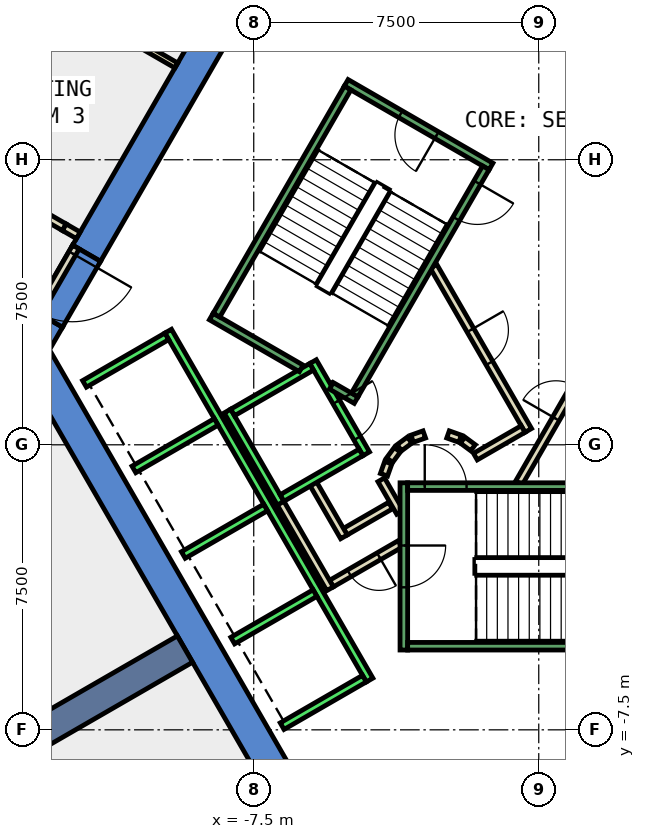
"""IFC4 building model, lengths in metres.
Left out: names, types, materials, properties, quantities, classifications, styles, units other than length and angle.
Written with IfcOpenShell. Run it as: python <this file> out.ifc"""

import sys

from ifc_helpers import new_model, si_unit, direction, frame, frame_2d, origin, place, context, subcontext, project, spatial, polyline, rectangle, outline, extrude, element, fill, save


model = new_model("IFC4")
c1 = context("Model", 3, precision=1e-05, world=origin(), true_north=direction((0.0, 1.0)))
c2 = subcontext(c1, "Body", "Model", "MODEL_VIEW")
j1 = project(units=[si_unit("LENGTHUNIT", "METRE"), si_unit("PLANEANGLEUNIT", "RADIAN")], contexts=[c1])
p1 = place(None, origin())
s1 = spatial("IfcSite", under=j1, at=p1, CompositionType="ELEMENT")
p2 = place(p1, origin())
s2 = spatial("IfcBuilding", under=s1, at=p2, CompositionType="ELEMENT")
p3 = place(p2, frame((0.0, 0.0, 124.4)))
s3 = spatial("IfcBuildingStorey", under=s2, at=p3, CompositionType="ELEMENT", Elevation=124.4)
p4 = place(p3, frame((0.0, 0.0, -0.4)))
e1 = element("IfcWall", 1, at=p4, inside=s3, PredefinedType="SHEAR", context=c2, shape_type="SweptSolid", body=[
    extrude(outline(polyline([(-12.267, 5.252), (-11.531, 4.827), (-6.437, 13.65), (-6.928, 14.5), (-12.267, 5.252)])), origin(), (0.0, 0.0, 1.0), 4.2),
])
p5 = place(p3, frame((0.0, 0.0, -0.4)))
e2 = element("IfcWall", 2, at=p5, inside=s3, PredefinedType="SHEAR", context=c2, shape_type="SweptSolid", body=[
    extrude(outline(polyline([(-12.531, 3.095), (-13.267, 3.52), (-13.856, 2.5), (-12.875, 2.5), (-12.531, 3.095)])), origin(), (0.0, 0.0, 1.0), 4.2),
])
p6 = place(p3, frame((0.0, 0.0, 3.6)))
e3 = element("IfcWall", 3, at=p6, inside=s3, PredefinedType="SHEAR", context=c2, shape_type="SweptSolid", body=[
    extrude(outline(polyline([(-13.267, 3.52), (-12.531, 3.095), (-11.531, 4.827), (-12.267, 5.252), (-13.267, 3.52)])), origin(), (0.0, 0.0, 1.0), 0.2),
])
p7 = place(p3, frame((0.0, 0.0, -0.4)))
e4 = element("IfcWall", 4, at=p7, inside=s3, PredefinedType="SHEAR", context=c2, shape_type="SweptSolid", body=[
    extrude(outline(polyline([(-13.856, 2.5), (-6.928, -9.5), (-6.437, -8.65), (-12.875, 2.5), (-13.856, 2.5)])), origin(), (0.0, 0.0, 1.0), 4.2),
])
p8 = place(p3, frame((-9.31, -5.375, -0.4), z_axis=(0.0, 0.0, 1.0), x_axis=(-0.866017533419, -0.500013631625, 0.0)))
e5 = element("IfcWall", 5, at=p8, inside=s3, PredefinedType="SHEAR", context=c2, shape_type="SweptSolid", body=[
    extrude(rectangle(XDim=9.0, YDim=0.8, at=frame_2d((4.5, 0.0))), origin(), (0.0, 0.0, 1.0), 4.2),
])
p9 = place(p3, frame((-16.441, 8.008, 0.0), z_axis=(0.0, 0.0, 1.0), x_axis=(0.866020923391, -0.500007760188, 0.0)))
e6 = element("IfcWall", 6, at=p9, inside=s3, PredefinedType="PARTITIONING", context=c2, shape_type="SweptSolid", body=[
    extrude(rectangle(XDim=4.568, YDim=0.2, at=frame_2d((2.284, 0.0))), origin(), (0.0, 0.0, 1.0), 3.8),
])
p10 = place(p9, frame((1.997, 0.0, 0.0)))
e7 = element("IfcOpeningElement", 7, at=p10, cuts=e6, PredefinedType="OPENING", context=c2, shape_type="SweptSolid", body=[
    extrude(rectangle(XDim=1.0, YDim=2.1, at=frame_2d((0.5, 1.05))), frame((0.0, 0.11, 0.0), z_axis=(0.0, -1.0, 0.0), x_axis=(1.0, 0.0, 0.0)), (0.0, 0.0, 1.0), 0.22),
])
p11 = place(p3, frame((-3.9, -1.599, 0.0), z_axis=(0.0, 0.0, 1.0), x_axis=(-0.865969445389, -0.500096910261, 0.0)))
e8 = element("IfcWall", 8, at=p11, inside=s3, PredefinedType="PARTITIONING", context=c2, shape_type="SweptSolid", body=[
    extrude(rectangle(XDim=1.373, YDim=0.2, at=frame_2d((0.687, 0.0))), origin(), (0.0, 0.0, 1.0), 3.8),
])
p12 = place(p3, frame((-5.126, -2.422, 0.0), z_axis=(0.0, 0.0, 1.0), x_axis=(-0.500062241894, 0.865989465428, 0.0)))
e9 = element("IfcWall", 9, at=p12, inside=s3, PredefinedType="PARTITIONING", context=c2, shape_type="SweptSolid", body=[
    extrude(rectangle(XDim=1.7, YDim=0.2, at=frame_2d((0.85, 0.0))), origin(), (0.0, 0.0, 1.0), 3.8),
])
p13 = place(p3, frame((-3.65, -2.61, 0.0), z_axis=(0.0, 0.0, 1.0), x_axis=(-0.866072462134, -0.499918483688, 0.0)))
e10 = element("IfcWall", 10, at=p13, inside=s3, PredefinedType="PARTITIONING", context=c2, shape_type="SweptSolid", body=[
    extrude(rectangle(XDim=2.084, YDim=0.2, at=frame_2d((1.042, 0.0))), origin(), (0.0, 0.0, 1.0), 3.8),
])
p14 = place(p13, frame((0.642, 0.0, 0.0)))
e11 = element("IfcOpeningElement", 11, at=p14, cuts=e10, PredefinedType="OPENING", context=c2, shape_type="SweptSolid", body=[
    extrude(rectangle(XDim=0.9, YDim=2.1, at=frame_2d((0.45, 1.05))), frame((0.0, 0.11, 0.0), z_axis=(0.0, -1.0, 0.0), x_axis=(1.0, 0.0, 0.0)), (0.0, 0.0, 1.0), 0.22),
])
p15 = place(p3, frame((-5.492, -3.788, 0.0), z_axis=(0.0, 0.0, 1.0), x_axis=(-0.500008949224, 0.866020236886, 0.0)))
e12 = element("IfcWall", 12, at=p15, inside=s3, PredefinedType="PARTITIONING", context=c2, shape_type="SweptSolid", body=[
    extrude(rectangle(XDim=2.68, YDim=0.2, at=frame_2d((1.34, 0.0))), origin(), (0.0, 0.0, 1.0), 3.8),
])
p16 = place(p3, frame((-4.145, -0.92, 0.0), z_axis=(0.0, 0.0, 1.0), x_axis=(0.499743786207, -0.866173278362, 0.0)))
e13 = element("IfcWall", 13, at=p16, inside=s3, PredefinedType="PARTITIONING", context=c2, shape_type="SweptSolid", body=[
    extrude(rectangle(XDim=0.991, YDim=0.2, at=frame_2d((0.495, 0.0))), origin(), (0.0, 0.0, 1.0), 3.8),
])
p17 = place(p3, frame((-9.537, 9.981, 0.0), z_axis=(0.0, 0.0, 1.0), x_axis=(-0.866035377451, 0.499982724704, 0.0)))
e14 = element("IfcWall", 14, at=p17, inside=s3, PredefinedType="PARTITIONING", context=c2, shape_type="SweptSolid", body=[
    extrude(rectangle(XDim=4.98, YDim=0.15, at=frame_2d((2.49, 0.0))), origin(), (0.0, 0.0, 1.0), 3.8),
])
p18 = place(p3, frame((-0.52, -1.0, 0.0), z_axis=(0.0, 0.0, 1.0), x_axis=(0.50011622646, 0.865958290007, 0.0)))
e15 = element("IfcWall", 15, at=p18, inside=s3, PredefinedType="PARTITIONING", context=c2, shape_type="SweptSolid", body=[
    extrude(rectangle(XDim=4.991, YDim=0.2, at=frame_2d((2.496, 0.0))), origin(), (0.0, 0.0, 1.0), 3.8),
])
p19 = place(p18, frame((1.945, 0.0, 0.0)))
e16 = element("IfcOpeningElement", 16, at=p19, cuts=e15, PredefinedType="OPENING", context=c2, shape_type="SweptSolid", body=[
    extrude(rectangle(XDim=1.0, YDim=2.1, at=frame_2d((0.5, 1.05))), frame((0.0, 0.11, 0.0), z_axis=(0.0, -1.0, 0.0), x_axis=(1.0, 0.0, 0.0)), (0.0, 0.0, 1.0), 0.22),
])
p20 = place(p3, frame((-2.771, 4.7, 0.0), z_axis=(0.0, 0.0, 1.0), x_axis=(0.499969479948, -0.866043023828, 0.0)))
e17 = element("IfcWall", 17, at=p20, inside=s3, PredefinedType="PARTITIONING", context=c2, shape_type="SweptSolid", body=[
    extrude(rectangle(XDim=4.99, YDim=0.2, at=frame_2d((2.495, 0.0))), origin(), (0.0, 0.0, 1.0), 3.8),
])
p21 = place(p20, frame((1.945, 0.0, 0.0)))
e18 = element("IfcOpeningElement", 18, at=p21, cuts=e17, PredefinedType="OPENING", context=c2, shape_type="SweptSolid", body=[
    extrude(rectangle(XDim=1.0, YDim=2.1, at=frame_2d((0.5, 1.05))), frame((0.0, 0.11, 0.0), z_axis=(0.0, -1.0, 0.0), x_axis=(1.0, 0.0, 0.0)), (0.0, 0.0, 1.0), 0.22),
])
p22 = place(p3, frame((-0.412, 0.414, 0.0), z_axis=(0.0, 0.0, 1.0), x_axis=(-0.866017369001, -0.500013916395, 0.0)))
e19 = element("IfcWall", 19, at=p22, inside=s3, PredefinedType="PARTITIONING", context=c2, shape_type="SweptSolid", body=[
    extrude(rectangle(XDim=1.45, YDim=0.2, at=frame_2d((0.725, 0.0))), origin(), (0.0, 0.0, 1.0), 3.8),
])
p23 = place(p3, frame((-1.731, -0.077, 0.0), z_axis=(0.0, 0.0, 1.0), x_axis=(-0.804311165252, 0.594208338422, 0.0)))
e20 = element("IfcWall", 20, at=p23, inside=s3, PredefinedType="PARTITIONING", context=c2, shape_type="SweptSolid", body=[
    extrude(rectangle(XDim=0.338, YDim=0.2, at=frame_2d((0.169, 0.0))), origin(), (0.0, 0.0, 1.0), 3.8),
])
p24 = place(p3, frame((-2.07, 0.16, 0.0), z_axis=(0.0, 0.0, 1.0), x_axis=(-0.942199461132, 0.335052496547, 0.0)))
e21 = element("IfcWall", 21, at=p24, inside=s3, PredefinedType="PARTITIONING", context=c2, shape_type="SweptSolid", body=[
    extrude(rectangle(XDim=0.337, YDim=0.2, at=frame_2d((0.169, 0.0))), origin(), (0.0, 0.0, 1.0), 3.8),
])
p25 = place(p3, frame((-3.012, 0.273, 0.0), z_axis=(0.0, 0.0, 1.0), x_axis=(-0.942280615813, -0.334824194261, 0.0)))
e22 = element("IfcWall", 22, at=p25, inside=s3, PredefinedType="PARTITIONING", context=c2, shape_type="SweptSolid", body=[
    extrude(rectangle(XDim=0.338, YDim=0.2, at=frame_2d((0.169, 0.0))), origin(), (0.0, 0.0, 1.0), 3.8),
])
p26 = place(p3, frame((-3.397, 0.124, 0.0), z_axis=(0.0, 0.0, 1.0), x_axis=(-0.804311165252, -0.594208338422, 0.0)))
e23 = element("IfcWall", 23, at=p26, inside=s3, PredefinedType="PARTITIONING", context=c2, shape_type="SweptSolid", body=[
    extrude(rectangle(XDim=0.338, YDim=0.2, at=frame_2d((0.169, 0.0))), origin(), (0.0, 0.0, 1.0), 3.8),
])
p27 = place(p3, frame((-3.723, -0.131, 0.0), z_axis=(0.0, 0.0, 1.0), x_axis=(-0.594675113454, -0.803966112121, 0.0)))
e24 = element("IfcWall", 24, at=p27, inside=s3, PredefinedType="PARTITIONING", context=c2, shape_type="SweptSolid", body=[
    extrude(rectangle(XDim=0.338, YDim=0.2, at=frame_2d((0.169, 0.0))), origin(), (0.0, 0.0, 1.0), 3.8),
])
p28 = place(p3, frame((-3.96, -0.47, 0.0), z_axis=(0.0, 0.0, 1.0), x_axis=(-0.334824194261, -0.942280615813, 0.0)))
e25 = element("IfcWall", 25, at=p28, inside=s3, PredefinedType="PARTITIONING", context=c2, shape_type="SweptSolid", body=[
    extrude(rectangle(XDim=0.338, YDim=0.2, at=frame_2d((0.169, 0.0))), origin(), (0.0, 0.0, 1.0), 3.8),
])
p29 = place(p3, frame((-12.18, 5.202, 0.0), z_axis=(0.0, 0.0, 1.0), x_axis=(-0.50002537861, -0.866010750942, 0.0)))
e26 = element("IfcWall", 26, at=p29, inside=s3, PredefinedType="PARTITIONING", context=c2, shape_type="SweptSolid", body=[
    extrude(rectangle(XDim=2.0, YDim=0.2, at=frame_2d((1.0, 0.0))), origin(), (0.0, 0.0, 1.0), 2.4),
])
p30 = place(p29, frame((0.19, 0.0, 0.0)))
e27 = element("IfcOpeningElement", 27, at=p30, cuts=e26, PredefinedType="OPENING", context=c2, shape_type="SweptSolid", body=[
    extrude(rectangle(XDim=1.8, YDim=2.1, at=frame_2d((0.9, 1.05))), frame((0.0, 0.11, 0.0), z_axis=(0.0, -1.0, 0.0), x_axis=(1.0, 0.0, 0.0)), (0.0, 0.0, 1.0), 0.22),
])
p31 = place(p3, frame((-12.485, 5.724, 0.0), z_axis=(0.0, 0.0, 1.0), x_axis=(0.866434177787, -0.499291313327, 0.0)))
e28 = element("IfcWall", 28, at=p31, inside=s3, PredefinedType="PARTITIONING", context=c2, shape_type="SweptSolid", body=[
    extrude(rectangle(XDim=0.425, YDim=0.2, at=frame_2d((0.212, 0.0))), origin(), (0.0, 0.0, 1.0), 2.4),
])
p32 = place(p3, frame((-5.94, 2.188, 0.0), z_axis=(0.0, 0.0, 1.0), x_axis=(0.49994636267, -0.866056369097, 0.0)))
e29 = element("IfcWall", 29, at=p32, inside=s3, PredefinedType="STANDARD", context=c2, shape_type="SweptSolid", body=[
    extrude(rectangle(XDim=2.8, YDim=0.2, at=frame_2d((1.4, 0.0))), origin(), (0.0, 0.0, 1.0), 3.8),
])
p33 = place(p32, frame((1.225, 0.0, 0.0)))
e30 = element("IfcOpeningElement", 30, at=p33, cuts=e29, PredefinedType="OPENING", context=c2, shape_type="SweptSolid", body=[
    extrude(rectangle(XDim=1.1, YDim=2.1, at=frame_2d((0.55, 1.05))), frame((0.0, 0.11, 0.0), z_axis=(0.0, -1.0, 0.0), x_axis=(1.0, 0.0, 0.0)), (0.0, 0.0, 1.0), 0.22),
])
p34 = place(p3, frame((-8.192, 0.888, 0.0), z_axis=(0.0, 0.0, 1.0), x_axis=(0.49994636267, -0.866056369097, 0.0)))
e31 = element("IfcWall", 31, at=p34, inside=s3, PredefinedType="STANDARD", context=c2, shape_type="SweptSolid", body=[
    extrude(rectangle(XDim=2.8, YDim=0.2, at=frame_2d((1.4, 0.0))), origin(), (0.0, 0.0, 1.0), 3.8),
])
for number, where, z_axis, x_axis in (
    (32, (-5.977, 2.052, 0.0), (0.0, 0.0, 1.0), (-0.866, -0.5, 0.0)),
    (33, (-4.677, -0.2, 0.0), (0.0, 0.0, 1.0), (-0.866, -0.5, 0.0)),
):
    element("IfcWall", number, at=place(p3, frame(where, z_axis=z_axis, x_axis=x_axis)), inside=s3, PredefinedType="STANDARD", context=c2, shape_type="SweptSolid", body=[
        extrude(rectangle(XDim=2.399, YDim=0.2, at=frame_2d((1.2, 0.0))), origin(), (0.0, 0.0, 1.0), 3.8),
    ])
p35 = place(p3, frame((-9.751, 2.99, 0.0), z_axis=(0.0, 0.0, 1.0), x_axis=(0.50000090737, -0.866024879913, 0.0)))
e34 = element("IfcWall", 34, at=p35, inside=s3, PredefinedType="STANDARD", context=c2, shape_type="SweptSolid", body=[
    extrude(rectangle(XDim=10.6, YDim=0.2, at=frame_2d((5.3, 0.0))), origin(), (0.0, 0.0, 1.0), 3.8),
])
p36 = place(p3, frame((-9.788, 2.853, 0.0), z_axis=(0.0, 0.0, 1.0), x_axis=(-0.865998541277, -0.500046524342, 0.0)))
e35 = element("IfcWall", 35, at=p36, inside=s3, PredefinedType="STANDARD", context=c2, shape_type="SweptSolid", body=[
    extrude(rectangle(XDim=2.5, YDim=0.2, at=frame_2d((1.25, 0.0))), origin(), (0.0, 0.0, 1.0), 3.8),
])
for number, where, z_axis, x_axis in (
    (36, (-8.488, 0.602, 0.0), (0.0, 0.0, 1.0), (-0.866, -0.5, 0.0)),
    (37, (-7.188, -1.65, 0.0), (0.0, 0.0, 1.0), (-0.866, -0.5, 0.0)),
    (38, (-5.888, -3.902, 0.0), (0.0, 0.0, 1.0), (-0.866, -0.5, 0.0)),
    (39, (-4.588, -6.153, 0.0), (0.0, 0.0, 1.0), (-0.866, -0.5, 0.0)),
):
    element("IfcWall", number, at=place(p3, frame(where, z_axis=z_axis, x_axis=x_axis)), inside=s3, PredefinedType="STANDARD", context=c2, shape_type="SweptSolid", body=[
        extrude(rectangle(XDim=2.5, YDim=0.2, at=frame_2d((1.25, 0.0))), origin(), (0.0, 0.0, 1.0), 3.8),
    ])
p37 = place(p3, frame((-3.55, -1.0, 0.0), z_axis=(0.0, 0.0, 1.0), x_axis=(0.0, -1.0, 0.0)))
e40 = element("IfcWall", 40, at=p37, inside=s3, PredefinedType="STANDARD", context=c2, shape_type="SweptSolid", body=[
    extrude(rectangle(XDim=4.4, YDim=0.2, at=frame_2d((2.2, 0.0))), origin(), (0.0, 0.0, 1.0), 3.8),
])
p38 = place(p37, frame((1.65, 0.0, 0.0)))
e41 = element("IfcOpeningElement", 41, at=p38, cuts=e40, PredefinedType="OPENING", context=c2, shape_type="SweptSolid", body=[
    extrude(rectangle(XDim=1.1, YDim=2.2, at=frame_2d((0.55, 1.1))), frame((0.0, 0.11, 0.0), z_axis=(0.0, -1.0, 0.0), x_axis=(1.0, 0.0, 0.0)), (0.0, 0.0, 1.0), 0.22),
])
p39 = place(p3, frame((-3.45, -1.1, 0.0), z_axis=(0.0, 0.0, 1.0), x_axis=(1.0, 0.0, 0.0)))
e42 = element("IfcWall", 42, at=p39, inside=s3, PredefinedType="STANDARD", context=c2, shape_type="SweptSolid", body=[
    extrude(rectangle(XDim=6.9, YDim=0.2, at=frame_2d((3.45, 0.0))), origin(), (0.0, 0.0, 1.0), 3.8),
])
p40 = place(p39, frame((0.45, 0.0, 0.0)))
e43 = element("IfcOpeningElement", 43, at=p40, cuts=e42, PredefinedType="OPENING", context=c2, shape_type="SweptSolid", body=[
    extrude(rectangle(XDim=1.1, YDim=2.2, at=frame_2d((0.55, 1.1))), frame((0.0, 0.11, 0.0), z_axis=(0.0, -1.0, 0.0), x_axis=(1.0, 0.0, 0.0)), (0.0, 0.0, 1.0), 0.22),
])
p41 = place(p3, frame((-3.45, -5.3, 0.0), z_axis=(0.0, 0.0, 1.0), x_axis=(1.0, 0.0, 0.0)))
e44 = element("IfcWall", 44, at=p41, inside=s3, PredefinedType="STANDARD", context=c2, shape_type="SweptSolid", body=[
    extrude(rectangle(XDim=6.9, YDim=0.2, at=frame_2d((3.45, 0.0))), origin(), (0.0, 0.0, 1.0), 3.8),
])
p42 = place(p3, frame((-1.256, 7.324, 0.0), z_axis=(0.0, 0.0, 1.0), x_axis=(-0.866046073146, 0.499964197906, 0.0)))
e45 = element("IfcWall", 45, at=p42, inside=s3, PredefinedType="STANDARD", context=c2, shape_type="SweptSolid", body=[
    extrude(rectangle(XDim=4.4, YDim=0.2, at=frame_2d((2.2, 0.0))), origin(), (0.0, 0.0, 1.0), 3.8),
])
p43 = place(p42, frame((1.65, 0.0, 0.0)))
e46 = element("IfcOpeningElement", 46, at=p43, cuts=e45, PredefinedType="OPENING", context=c2, shape_type="SweptSolid", body=[
    extrude(rectangle(XDim=1.1, YDim=2.2, at=frame_2d((0.55, 1.1))), frame((0.0, 0.11, 0.0), z_axis=(0.0, -1.0, 0.0), x_axis=(1.0, 0.0, 0.0)), (0.0, 0.0, 1.0), 0.22),
])
p44 = place(p3, frame((-6.25, 2.01, 0.0), z_axis=(0.0, 0.0, 1.0), x_axis=(-0.86611865017, 0.499838457731, 0.0)))
e47 = element("IfcWall", 47, at=p44, inside=s3, PredefinedType="STANDARD", context=c2, shape_type="SweptSolid", body=[
    extrude(rectangle(XDim=2.733, YDim=0.2, at=frame_2d((1.366, 0.0))), origin(), (0.0, 0.0, 1.0), 3.8),
])
p45 = place(p3, frame((-4.806, 1.176, 0.0), z_axis=(0.0, 0.0, 1.0), x_axis=(-0.866558586415, 0.499075361355, 0.0)))
e48 = element("IfcWall", 48, at=p45, inside=s3, PredefinedType="STANDARD", context=c2, shape_type="SweptSolid", body=[
    extrude(rectangle(XDim=0.751, YDim=0.2, at=frame_2d((0.376, 0.0))), origin(), (0.0, 0.0, 1.0), 3.8),
])
p46 = place(p3, frame((-1.393, 7.288, 0.0), z_axis=(0.0, 0.0, 1.0), x_axis=(-0.499963383562, -0.866046543262, 0.0)))
e49 = element("IfcWall", 49, at=p46, inside=s3, PredefinedType="STANDARD", context=c2, shape_type="SweptSolid", body=[
    extrude(rectangle(XDim=6.9, YDim=0.2, at=frame_2d((3.45, 0.0))), origin(), (0.0, 0.0, 1.0), 3.8),
])
p47 = place(p46, frame((0.45, 0.0, 0.0)))
e50 = element("IfcOpeningElement", 50, at=p47, cuts=e49, PredefinedType="OPENING", context=c2, shape_type="SweptSolid", body=[
    extrude(rectangle(XDim=1.1, YDim=2.2, at=frame_2d((0.55, 1.1))), frame((0.0, 0.11, 0.0), z_axis=(0.0, -1.0, 0.0), x_axis=(1.0, 0.0, 0.0)), (0.0, 0.0, 1.0), 0.22),
])
p48 = place(p3, frame((-5.03, 9.388, 0.0), z_axis=(0.0, 0.0, 1.0), x_axis=(-0.499978703459, -0.866037698999, 0.0)))
e51 = element("IfcWall", 51, at=p48, inside=s3, PredefinedType="STANDARD", context=c2, shape_type="SweptSolid", body=[
    extrude(rectangle(XDim=6.9, YDim=0.2, at=frame_2d((3.45, 0.0))), origin(), (0.0, 0.0, 1.0), 3.8),
])
p49 = place(p19, origin())
e52 = element("IfcDoor", 52, at=p49, inside=s3, OperationType="SINGLE_SWING_LEFT", PredefinedType="DOOR", context=c2, shape_type="SweptSolid", body=[
    extrude(rectangle(XDim=1.0, YDim=2.1, at=frame_2d((0.5, 1.05))), frame((0.0, 0.025, 0.0), z_axis=(0.0, -1.0, 0.0), x_axis=(1.0, 0.0, 0.0)), (0.0, 0.0, 1.0), 0.05),
])
fill(e16, e52)
p50 = place(p21, origin())
e53 = element("IfcDoor", 53, at=p50, inside=s3, OperationType="SINGLE_SWING_RIGHT", PredefinedType="DOOR", context=c2, shape_type="SweptSolid", body=[
    extrude(rectangle(XDim=1.0, YDim=2.1, at=frame_2d((0.5, 1.05))), frame((0.0, 0.025, 0.0), z_axis=(0.0, -1.0, 0.0), x_axis=(1.0, 0.0, 0.0)), (0.0, 0.0, 1.0), 0.05),
])
fill(e18, e53)
p51 = place(p14, origin())
e54 = element("IfcDoor", 54, at=p51, inside=s3, OperationType="SINGLE_SWING_LEFT", PredefinedType="DOOR", context=c2, shape_type="SweptSolid", body=[
    extrude(rectangle(XDim=0.9, YDim=2.1, at=frame_2d((0.45, 1.05))), frame((0.0, 0.025, 0.0), z_axis=(0.0, -1.0, 0.0), x_axis=(1.0, 0.0, 0.0)), (0.0, 0.0, 1.0), 0.05),
])
fill(e11, e54)
p52 = place(p30, origin())
e55 = element("IfcDoor", 55, at=p52, inside=s3, OperationType="DOUBLE_DOOR_SINGLE_SWING", PredefinedType="DOOR", context=c2, shape_type="SweptSolid", body=[
    extrude(rectangle(XDim=1.8, YDim=2.1, at=frame_2d((0.9, 1.05))), frame((0.0, 0.025, 0.0), z_axis=(0.0, -1.0, 0.0), x_axis=(1.0, 0.0, 0.0)), (0.0, 0.0, 1.0), 0.05),
])
fill(e27, e55)
p53 = place(p33, origin())
e56 = element("IfcDoor", 56, at=p53, inside=s3, OperationType="SLIDING_TO_LEFT", PredefinedType="DOOR", context=c2, shape_type="SweptSolid", body=[
    extrude(rectangle(XDim=1.1, YDim=2.1, at=frame_2d((0.55, 1.05))), frame((0.0, 0.025, 0.0), z_axis=(0.0, -1.0, 0.0), x_axis=(1.0, 0.0, 0.0)), (0.0, 0.0, 1.0), 0.05),
])
fill(e30, e56)
p54 = place(p40, origin())
e57 = element("IfcDoor", 57, at=p54, inside=s3, OperationType="SINGLE_SWING_LEFT", PredefinedType="DOOR", context=c2, shape_type="SweptSolid", body=[
    extrude(rectangle(XDim=1.1, YDim=2.2, at=frame_2d((0.55, 1.1))), frame((0.0, 0.025, 0.0), z_axis=(0.0, -1.0, 0.0), x_axis=(1.0, 0.0, 0.0)), (0.0, 0.0, 1.0), 0.05),
])
fill(e43, e57)
p55 = place(p38, origin())
e58 = element("IfcDoor", 58, at=p55, inside=s3, OperationType="SINGLE_SWING_LEFT", PredefinedType="DOOR", context=c2, shape_type="SweptSolid", body=[
    extrude(rectangle(XDim=1.1, YDim=2.2, at=frame_2d((0.55, 1.1))), frame((0.0, 0.025, 0.0), z_axis=(0.0, -1.0, 0.0), x_axis=(1.0, 0.0, 0.0)), (0.0, 0.0, 1.0), 0.05),
])
fill(e41, e58)
p56 = place(p47, origin())
e59 = element("IfcDoor", 59, at=p56, inside=s3, OperationType="SINGLE_SWING_LEFT", PredefinedType="DOOR", context=c2, shape_type="SweptSolid", body=[
    extrude(rectangle(XDim=1.1, YDim=2.2, at=frame_2d((0.55, 1.1))), frame((0.0, 0.025, 0.0), z_axis=(0.0, -1.0, 0.0), x_axis=(1.0, 0.0, 0.0)), (0.0, 0.0, 1.0), 0.05),
])
fill(e50, e59)
p57 = place(p43, origin())
e60 = element("IfcDoor", 60, at=p57, inside=s3, OperationType="SINGLE_SWING_LEFT", PredefinedType="DOOR", context=c2, shape_type="SweptSolid", body=[
    extrude(rectangle(XDim=1.1, YDim=2.2, at=frame_2d((0.55, 1.1))), frame((0.0, 0.025, 0.0), z_axis=(0.0, -1.0, 0.0), x_axis=(1.0, 0.0, 0.0)), (0.0, 0.0, 1.0), 0.05),
])
fill(e46, e60)
save(model, sys.argv[1])
